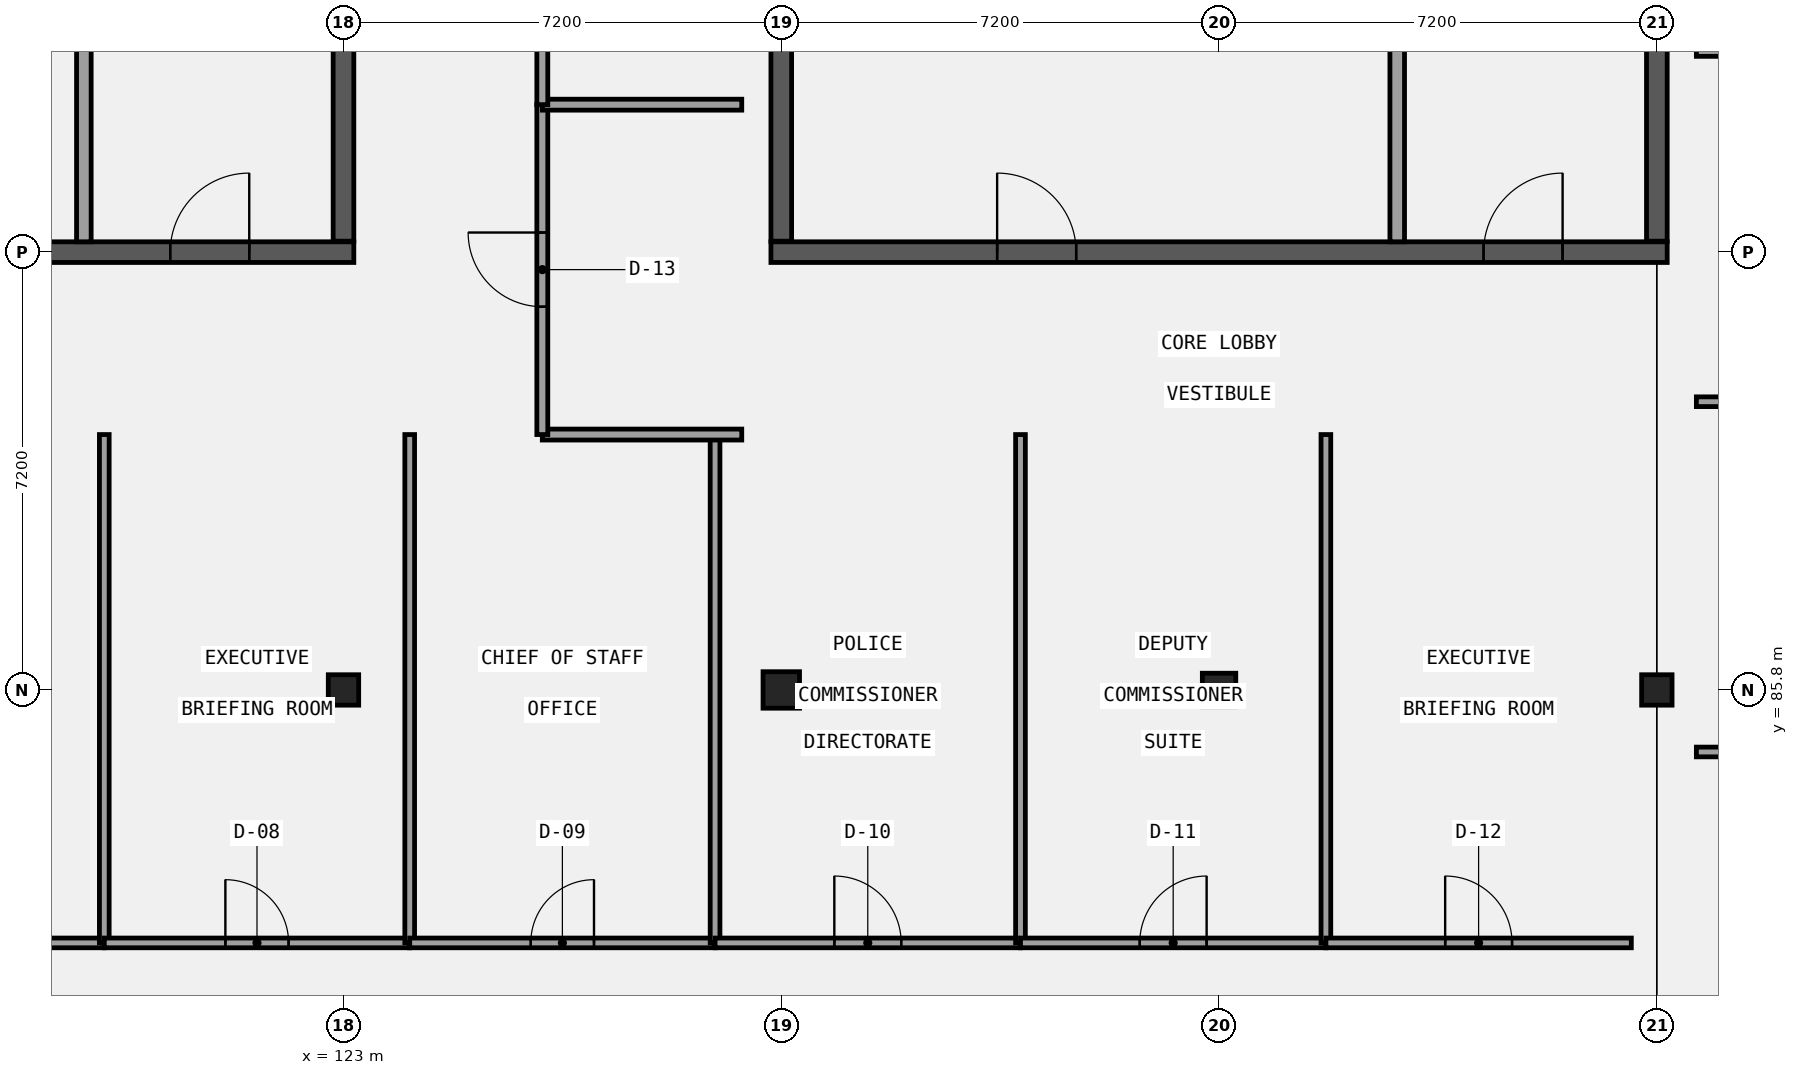
"""IFC4 building model, lengths in metres.
Left out: names, types, materials, properties, quantities, classifications, styles, units other than length and angle.
Written with IfcOpenShell. Run it as: python <this file> out.ifc"""

import sys

from ifc_helpers import new_model, si_unit, direction, frame, frame_2d, origin, origin_2d, place, context, subcontext, project, spatial, rectangle, extrude, element, fill, save


model = new_model("IFC4")
c1 = context("Model", 3, precision=1e-05, world=origin(), true_north=direction((0.0, 1.0)))
c2 = subcontext(c1, "Body", "Model", "MODEL_VIEW")
j1 = project(units=[si_unit("LENGTHUNIT", "METRE"), si_unit("PLANEANGLEUNIT", "RADIAN")], contexts=[c1])
p1 = place(None, origin())
s1 = spatial("IfcSite", under=j1, at=p1, CompositionType="ELEMENT")
p2 = place(p1, origin())
s2 = spatial("IfcBuilding", under=s1, at=p2, CompositionType="ELEMENT")
p3 = place(p2, frame((0.0, 0.0, 22.2)))
s3 = spatial("IfcBuildingStorey", under=s2, at=p3, CompositionType="ELEMENT", Elevation=22.2)
p4 = place(p3, frame((108.43, 93.0, 0.0), z_axis=(0.0, 0.0, 1.0), x_axis=(1.0, 0.0, 0.0)))
e1 = element("IfcWall", 1, at=p4, inside=s3, PredefinedType="SHEAR", context=c2, shape_type="SweptSolid", body=[
    extrude(rectangle(XDim=14.74, YDim=0.34, at=frame_2d((7.37, 0.0))), origin(), (0.0, 0.0, 1.0), 4.2),
])
p5 = place(p4, frame((3.72, 0.0, 0.0)))
e2 = element("IfcOpeningElement", 2, at=p5, cuts=e1, PredefinedType="OPENING", context=c2, shape_type="SweptSolid", body=[
    extrude(rectangle(XDim=1.3, YDim=2.2, at=frame_2d((0.65, 1.1))), frame((0.0, 0.18, 0.0), z_axis=(0.0, -1.0, 0.0), x_axis=(1.0, 0.0, 0.0)), (0.0, 0.0, 1.0), 0.36),
])
p6 = place(p4, frame((11.72, 0.0, 0.0)))
e3 = element("IfcOpeningElement", 3, at=p6, cuts=e1, PredefinedType="OPENING", context=c2, shape_type="SweptSolid", body=[
    extrude(rectangle(XDim=1.3, YDim=2.2, at=frame_2d((0.65, 1.1))), frame((0.0, 0.18, 0.0), z_axis=(0.0, -1.0, 0.0), x_axis=(1.0, 0.0, 0.0)), (0.0, 0.0, 1.0), 0.36),
])
p7 = place(p3, frame((123.0, 93.18, 0.0), z_axis=(0.0, 0.0, 1.0), x_axis=(0.0, 1.0, 0.0)))
e4 = element("IfcWall", 4, at=p7, inside=s3, PredefinedType="SHEAR", context=c2, shape_type="SweptSolid", body=[
    extrude(rectangle(XDim=6.84, YDim=0.34, at=frame_2d((3.42, 0.0))), origin(), (0.0, 0.0, 1.0), 4.2),
])
p8 = place(p3, frame((130.03, 93.0, 0.0), z_axis=(0.0, 0.0, 1.0), x_axis=(1.0, 0.0, 0.0)))
e5 = element("IfcWall", 5, at=p8, inside=s3, PredefinedType="SHEAR", context=c2, shape_type="SweptSolid", body=[
    extrude(rectangle(XDim=14.74, YDim=0.34, at=frame_2d((7.37, 0.0))), origin(), (0.0, 0.0, 1.0), 4.2),
])
p9 = place(p8, frame((3.72, 0.0, 0.0)))
e6 = element("IfcOpeningElement", 6, at=p9, cuts=e5, PredefinedType="OPENING", context=c2, shape_type="SweptSolid", body=[
    extrude(rectangle(XDim=1.3, YDim=2.2, at=frame_2d((0.65, 1.1))), frame((0.0, 0.18, 0.0), z_axis=(0.0, -1.0, 0.0), x_axis=(1.0, 0.0, 0.0)), (0.0, 0.0, 1.0), 0.36),
])
p10 = place(p8, frame((11.72, 0.0, 0.0)))
e7 = element("IfcOpeningElement", 7, at=p10, cuts=e5, PredefinedType="OPENING", context=c2, shape_type="SweptSolid", body=[
    extrude(rectangle(XDim=1.3, YDim=2.2, at=frame_2d((0.65, 1.1))), frame((0.0, 0.18, 0.0), z_axis=(0.0, -1.0, 0.0), x_axis=(1.0, 0.0, 0.0)), (0.0, 0.0, 1.0), 0.36),
])
for number, where, z_axis, x_axis in (
    (8, (130.2, 93.18, 0.0), (0.0, 0.0, 1.0), (0.0, 1.0, 0.0)),
    (9, (144.6, 93.18, 0.0), (0.0, 0.0, 1.0), (0.0, 1.0, 0.0)),
):
    element("IfcWall", number, at=place(p3, frame(where, z_axis=z_axis, x_axis=x_axis)), inside=s3, PredefinedType="SHEAR", context=c2, shape_type="SweptSolid", body=[
        extrude(rectangle(XDim=6.84, YDim=0.34, at=frame_2d((3.42, 0.0))), origin(), (0.0, 0.0, 1.0), 4.2),
    ])
p11 = place(p3, frame((123.0, 85.8, 0.0), z_axis=(0.0, 0.0, 1.0), x_axis=(1.0, 0.0, 0.0)))
e10 = element("IfcColumn", 10, at=p11, inside=s3, PredefinedType="COLUMN", context=c2, shape_type="SweptSolid", body=[
    extrude(rectangle(XDim=0.5, YDim=0.5, at=origin_2d()), origin(), (0.0, 0.0, 1.0), 4.2),
])
p12 = place(p3, frame((130.2, 85.8, 0.0), z_axis=(0.0, 0.0, 1.0), x_axis=(1.0, 0.0, 0.0)))
e11 = element("IfcColumn", 11, at=p12, inside=s3, PredefinedType="COLUMN", context=c2, shape_type="SweptSolid", body=[
    extrude(rectangle(XDim=0.6, YDim=0.6, at=origin_2d()), origin(), (0.0, 0.0, 1.0), 4.2),
])
p13 = place(p3, frame((137.4, 85.8, 0.0), z_axis=(0.0, 0.0, 1.0), x_axis=(1.0, 0.0, 0.0)))
e12 = element("IfcColumn", 12, at=p13, inside=s3, PredefinedType="COLUMN", context=c2, shape_type="SweptSolid", body=[
    extrude(rectangle(XDim=0.55, YDim=0.55, at=origin_2d()), origin(), (0.0, 0.0, 1.0), 4.2),
])
p14 = place(p3, frame((144.6, 85.8, 0.0), z_axis=(0.0, 0.0, 1.0), x_axis=(1.0, 0.0, 0.0)))
e13 = element("IfcColumn", 13, at=p14, inside=s3, PredefinedType="COLUMN", context=c2, shape_type="SweptSolid", body=[
    extrude(rectangle(XDim=0.5, YDim=0.5, at=origin_2d()), origin(), (0.0, 0.0, 1.0), 4.2),
])
for number, where, z_axis, x_axis in (
    (14, (118.73, 93.17, 0.0), (0.0, 0.0, 1.0), (0.0, 1.0, 0.0)),
    (15, (140.33, 93.17, 0.0), (0.0, 0.0, 1.0), (0.0, 1.0, 0.0)),
):
    element("IfcWall", number, at=place(p3, frame(where, z_axis=z_axis, x_axis=x_axis)), inside=s3, PredefinedType="SOLIDWALL", context=c2, shape_type="SweptSolid", body=[
        extrude(rectangle(XDim=3.28, YDim=0.24, at=frame_2d((1.64, 0.0))), origin(), (0.0, 0.0, 1.0), 3.89),
    ])
p15 = place(p3, frame((114.043, 81.64, 0.0), z_axis=(0.0, 0.0, 1.0), x_axis=(1.0, 0.0, 0.0)))
e16 = element("IfcWall", 16, at=p15, inside=s3, PredefinedType="PARTITIONING", context=c2, shape_type="SweptSolid", body=[
    extrude(rectangle(XDim=5.023, YDim=0.16, at=frame_2d((2.511, 0.0))), origin(), (0.0, 0.0, 1.0), 3.92),
])
p16 = place(p15, frame((1.991, 0.0, 0.0)))
e17 = element("IfcOpeningElement", 17, at=p16, cuts=e16, PredefinedType="OPENING", context=c2, shape_type="SweptSolid", body=[
    extrude(rectangle(XDim=1.04, YDim=2.1, at=frame_2d((0.52, 1.05))), frame((0.0, 0.09, 0.0), z_axis=(0.0, -1.0, 0.0), x_axis=(1.0, 0.0, 0.0)), (0.0, 0.0, 1.0), 0.18),
])
p17 = place(p3, frame((119.066, 81.64, 0.0), z_axis=(0.0, 0.0, 1.0), x_axis=(0.0, 1.0, 0.0)))
e18 = element("IfcWall", 18, at=p17, inside=s3, PredefinedType="PARTITIONING", context=c2, shape_type="SweptSolid", body=[
    extrude(rectangle(XDim=8.36, YDim=0.16, at=frame_2d((4.18, 0.0))), origin(), (0.0, 0.0, 1.0), 3.92),
])
p18 = place(p3, frame((119.066, 81.64, 0.0), z_axis=(0.0, 0.0, 1.0), x_axis=(1.0, 0.0, 0.0)))
e19 = element("IfcWall", 19, at=p18, inside=s3, PredefinedType="PARTITIONING", context=c2, shape_type="SweptSolid", body=[
    extrude(rectangle(XDim=5.023, YDim=0.16, at=frame_2d((2.512, 0.0))), origin(), (0.0, 0.0, 1.0), 3.92),
])
p19 = place(p18, frame((1.991, 0.0, 0.0)))
e20 = element("IfcOpeningElement", 20, at=p19, cuts=e19, PredefinedType="OPENING", context=c2, shape_type="SweptSolid", body=[
    extrude(rectangle(XDim=1.04, YDim=2.22, at=frame_2d((0.52, 1.11))), frame((0.0, 0.09, 0.0), z_axis=(0.0, -1.0, 0.0), x_axis=(1.0, 0.0, 0.0)), (0.0, 0.0, 1.0), 0.18),
])
p20 = place(p3, frame((124.089, 81.64, 0.0), z_axis=(0.0, 0.0, 1.0), x_axis=(0.0, 1.0, 0.0)))
e21 = element("IfcWall", 21, at=p20, inside=s3, PredefinedType="PARTITIONING", context=c2, shape_type="SweptSolid", body=[
    extrude(rectangle(XDim=8.36, YDim=0.16, at=frame_2d((4.18, 0.0))), origin(), (0.0, 0.0, 1.0), 3.92),
])
p21 = place(p3, frame((124.089, 81.64, 0.0), z_axis=(0.0, 0.0, 1.0), x_axis=(1.0, 0.0, 0.0)))
e22 = element("IfcWall", 22, at=p21, inside=s3, PredefinedType="PARTITIONING", context=c2, shape_type="SweptSolid", body=[
    extrude(rectangle(XDim=5.022, YDim=0.16, at=frame_2d((2.511, 0.0))), origin(), (0.0, 0.0, 1.0), 3.92),
])
p22 = place(p21, frame((1.991, 0.0, 0.0)))
e23 = element("IfcOpeningElement", 23, at=p22, cuts=e22, PredefinedType="OPENING", context=c2, shape_type="SweptSolid", body=[
    extrude(rectangle(XDim=1.04, YDim=2.35, at=frame_2d((0.52, 1.175))), frame((0.0, 0.09, 0.0), z_axis=(0.0, -1.0, 0.0), x_axis=(1.0, 0.0, 0.0)), (0.0, 0.0, 1.0), 0.18),
])
p23 = place(p3, frame((129.111, 81.64, 0.0), z_axis=(0.0, 0.0, 1.0), x_axis=(0.0, 1.0, 0.0)))
e24 = element("IfcWall", 24, at=p23, inside=s3, PredefinedType="PARTITIONING", context=c2, shape_type="SweptSolid", body=[
    extrude(rectangle(XDim=8.36, YDim=0.16, at=frame_2d((4.18, 0.0))), origin(), (0.0, 0.0, 1.0), 3.92),
])
p24 = place(p3, frame((129.111, 81.64, 0.0), z_axis=(0.0, 0.0, 1.0), x_axis=(1.0, 0.0, 0.0)))
e25 = element("IfcWall", 25, at=p24, inside=s3, PredefinedType="PARTITIONING", context=c2, shape_type="SweptSolid", body=[
    extrude(rectangle(XDim=5.023, YDim=0.16, at=frame_2d((2.511, 0.0))), origin(), (0.0, 0.0, 1.0), 3.92),
])
p25 = place(p24, frame((1.961, 0.0, 0.0)))
e26 = element("IfcOpeningElement", 26, at=p25, cuts=e25, PredefinedType="OPENING", context=c2, shape_type="SweptSolid", body=[
    extrude(rectangle(XDim=1.1, YDim=2.1, at=frame_2d((0.55, 1.05))), frame((0.0, 0.09, 0.0), z_axis=(0.0, -1.0, 0.0), x_axis=(1.0, 0.0, 0.0)), (0.0, 0.0, 1.0), 0.18),
])
p26 = place(p3, frame((134.134, 81.64, 0.0), z_axis=(0.0, 0.0, 1.0), x_axis=(0.0, 1.0, 0.0)))
e27 = element("IfcWall", 27, at=p26, inside=s3, PredefinedType="PARTITIONING", context=c2, shape_type="SweptSolid", body=[
    extrude(rectangle(XDim=8.36, YDim=0.16, at=frame_2d((4.18, 0.0))), origin(), (0.0, 0.0, 1.0), 3.92),
])
p27 = place(p3, frame((134.134, 81.64, 0.0), z_axis=(0.0, 0.0, 1.0), x_axis=(1.0, 0.0, 0.0)))
e28 = element("IfcWall", 28, at=p27, inside=s3, PredefinedType="PARTITIONING", context=c2, shape_type="SweptSolid", body=[
    extrude(rectangle(XDim=5.023, YDim=0.16, at=frame_2d((2.511, 0.0))), origin(), (0.0, 0.0, 1.0), 3.92),
])
p28 = place(p27, frame((1.961, 0.0, 0.0)))
e29 = element("IfcOpeningElement", 29, at=p28, cuts=e28, PredefinedType="OPENING", context=c2, shape_type="SweptSolid", body=[
    extrude(rectangle(XDim=1.1, YDim=2.22, at=frame_2d((0.55, 1.11))), frame((0.0, 0.09, 0.0), z_axis=(0.0, -1.0, 0.0), x_axis=(1.0, 0.0, 0.0)), (0.0, 0.0, 1.0), 0.18),
])
p29 = place(p3, frame((139.157, 81.64, 0.0), z_axis=(0.0, 0.0, 1.0), x_axis=(0.0, 1.0, 0.0)))
e30 = element("IfcWall", 30, at=p29, inside=s3, PredefinedType="PARTITIONING", context=c2, shape_type="SweptSolid", body=[
    extrude(rectangle(XDim=8.36, YDim=0.16, at=frame_2d((4.18, 0.0))), origin(), (0.0, 0.0, 1.0), 3.92),
])
p30 = place(p3, frame((139.157, 81.64, 0.0), z_axis=(0.0, 0.0, 1.0), x_axis=(1.0, 0.0, 0.0)))
e31 = element("IfcWall", 31, at=p30, inside=s3, PredefinedType="PARTITIONING", context=c2, shape_type="SweptSolid", body=[
    extrude(rectangle(XDim=5.023, YDim=0.16, at=frame_2d((2.511, 0.0))), origin(), (0.0, 0.0, 1.0), 3.92),
])
p31 = place(p30, frame((1.961, 0.0, 0.0)))
e32 = element("IfcOpeningElement", 32, at=p31, cuts=e31, PredefinedType="OPENING", context=c2, shape_type="SweptSolid", body=[
    extrude(rectangle(XDim=1.1, YDim=2.35, at=frame_2d((0.55, 1.175))), frame((0.0, 0.09, 0.0), z_axis=(0.0, -1.0, 0.0), x_axis=(1.0, 0.0, 0.0)), (0.0, 0.0, 1.0), 0.18),
])
p32 = place(p3, frame((126.27, 90.0, 0.0), z_axis=(0.0, 0.0, 1.0), x_axis=(1.0, 0.0, 0.0)))
e33 = element("IfcWall", 33, at=p32, inside=s3, PredefinedType="PARTITIONING", context=c2, shape_type="SweptSolid", body=[
    extrude(rectangle(XDim=3.28, YDim=0.18, at=frame_2d((1.64, 0.0))), origin(), (0.0, 0.0, 1.0), 3.92),
])
p33 = place(p3, frame((126.27, 90.0, 0.0), z_axis=(0.0, 0.0, 1.0), x_axis=(0.0, 1.0, 0.0)))
e34 = element("IfcWall", 34, at=p33, inside=s3, PredefinedType="PARTITIONING", context=c2, shape_type="SweptSolid", body=[
    extrude(rectangle(XDim=5.425, YDim=0.18, at=frame_2d((2.712, 0.0))), origin(), (0.0, 0.0, 1.0), 3.92),
])
p34 = place(p33, frame((2.103, 0.0, 0.0)))
e35 = element("IfcOpeningElement", 35, at=p34, cuts=e34, PredefinedType="OPENING", context=c2, shape_type="SweptSolid", body=[
    extrude(rectangle(XDim=1.22, YDim=2.1, at=frame_2d((0.61, 1.05))), frame((0.0, 0.1, 0.0), z_axis=(0.0, -1.0, 0.0), x_axis=(1.0, 0.0, 0.0)), (0.0, 0.0, 1.0), 0.2),
])
p35 = place(p3, frame((126.27, 95.425, 0.0), z_axis=(0.0, 0.0, 1.0), x_axis=(1.0, 0.0, 0.0)))
e36 = element("IfcWall", 36, at=p35, inside=s3, PredefinedType="PARTITIONING", context=c2, shape_type="SweptSolid", body=[
    extrude(rectangle(XDim=3.28, YDim=0.18, at=frame_2d((1.64, 0.0))), origin(), (0.0, 0.0, 1.0), 3.92),
])
p36 = place(p3, frame((126.27, 95.425, 0.0), z_axis=(0.0, 0.0, 1.0), x_axis=(0.0, 1.0, 0.0)))
e37 = element("IfcWall", 37, at=p36, inside=s3, PredefinedType="PARTITIONING", context=c2, shape_type="SweptSolid", body=[
    extrude(rectangle(XDim=5.425, YDim=0.18, at=frame_2d((2.712, 0.0))), origin(), (0.0, 0.0, 1.0), 3.92),
])
p37 = place(p36, frame((2.103, 0.0, 0.0)))
e38 = element("IfcOpeningElement", 38, at=p37, cuts=e37, PredefinedType="OPENING", context=c2, shape_type="SweptSolid", body=[
    extrude(rectangle(XDim=1.22, YDim=2.22, at=frame_2d((0.61, 1.11))), frame((0.0, 0.1, 0.0), z_axis=(0.0, -1.0, 0.0), x_axis=(1.0, 0.0, 0.0)), (0.0, 0.0, 1.0), 0.2),
])
for number, where, z_axis, x_axis in (
    (39, (145.25, 84.78, 0.0), (0.0, 0.0, 1.0), (1.0, 0.0, 0.0)),
    (40, (145.25, 90.54, 0.0), (0.0, 0.0, 1.0), (1.0, 0.0, 0.0)),
    (41, (145.25, 96.3, 0.0), (0.0, 0.0, 1.0), (1.0, 0.0, 0.0)),
):
    element("IfcWall", number, at=place(p3, frame(where, z_axis=z_axis, x_axis=x_axis)), inside=s3, PredefinedType="PARTITIONING", context=c2, shape_type="SweptSolid", body=[
        extrude(rectangle(XDim=8.645, YDim=0.16, at=frame_2d((4.323, 0.0))), origin(), (0.0, 0.0, 1.0), 3.92),
    ])
p38 = place(p6, frame((1.3, 0.0, 0.0), z_axis=(0.0, 0.0, 1.0), x_axis=(-1.0, 0.0, 0.0)))
e42 = element("IfcDoor", 42, at=p38, inside=s3, OperationType="SINGLE_SWING_RIGHT", PredefinedType="DOOR", context=c2, shape_type="SweptSolid", body=[
    extrude(rectangle(XDim=1.3, YDim=2.2, at=frame_2d((0.65, 1.1))), frame((0.0, 0.025, 0.0), z_axis=(0.0, -1.0, 0.0), x_axis=(1.0, 0.0, 0.0)), (0.0, 0.0, 1.0), 0.05),
])
fill(e3, e42)
p39 = place(p9, frame((1.3, 0.0, 0.0), z_axis=(0.0, 0.0, 1.0), x_axis=(-1.0, 0.0, 0.0)))
e43 = element("IfcDoor", 43, at=p39, inside=s3, OperationType="SINGLE_SWING_LEFT", PredefinedType="DOOR", context=c2, shape_type="SweptSolid", body=[
    extrude(rectangle(XDim=1.3, YDim=2.2, at=frame_2d((0.65, 1.1))), frame((0.0, 0.025, 0.0), z_axis=(0.0, -1.0, 0.0), x_axis=(1.0, 0.0, 0.0)), (0.0, 0.0, 1.0), 0.05),
])
fill(e6, e43)
p40 = place(p10, frame((1.3, 0.0, 0.0), z_axis=(0.0, 0.0, 1.0), x_axis=(-1.0, 0.0, 0.0)))
e44 = element("IfcDoor", 44, at=p40, inside=s3, OperationType="SINGLE_SWING_RIGHT", PredefinedType="DOOR", context=c2, shape_type="SweptSolid", body=[
    extrude(rectangle(XDim=1.3, YDim=2.2, at=frame_2d((0.65, 1.1))), frame((0.0, 0.025, 0.0), z_axis=(0.0, -1.0, 0.0), x_axis=(1.0, 0.0, 0.0)), (0.0, 0.0, 1.0), 0.05),
])
fill(e7, e44)
p41 = place(p19, origin())
e45 = element("IfcDoor", 45, at=p41, inside=s3, OperationType="SINGLE_SWING_LEFT", PredefinedType="DOOR", context=c2, shape_type="SweptSolid", body=[
    extrude(rectangle(XDim=1.04, YDim=2.22, at=frame_2d((0.52, 1.11))), frame((0.0, 0.025, 0.0), z_axis=(0.0, -1.0, 0.0), x_axis=(1.0, 0.0, 0.0)), (0.0, 0.0, 1.0), 0.05),
])
fill(e20, e45)
p42 = place(p22, origin())
e46 = element("IfcDoor", 46, at=p42, inside=s3, OperationType="SINGLE_SWING_RIGHT", PredefinedType="DOOR", context=c2, shape_type="SweptSolid", body=[
    extrude(rectangle(XDim=1.04, YDim=2.35, at=frame_2d((0.52, 1.175))), frame((0.0, 0.025, 0.0), z_axis=(0.0, -1.0, 0.0), x_axis=(1.0, 0.0, 0.0)), (0.0, 0.0, 1.0), 0.05),
])
fill(e23, e46)
p43 = place(p25, origin())
e47 = element("IfcDoor", 47, at=p43, inside=s3, OperationType="SINGLE_SWING_LEFT", PredefinedType="DOOR", context=c2, shape_type="SweptSolid", body=[
    extrude(rectangle(XDim=1.1, YDim=2.1, at=frame_2d((0.55, 1.05))), frame((0.0, 0.025, 0.0), z_axis=(0.0, -1.0, 0.0), x_axis=(1.0, 0.0, 0.0)), (0.0, 0.0, 1.0), 0.05),
])
fill(e26, e47)
p44 = place(p28, origin())
e48 = element("IfcDoor", 48, at=p44, inside=s3, OperationType="SINGLE_SWING_RIGHT", PredefinedType="DOOR", context=c2, shape_type="SweptSolid", body=[
    extrude(rectangle(XDim=1.1, YDim=2.22, at=frame_2d((0.55, 1.11))), frame((0.0, 0.025, 0.0), z_axis=(0.0, -1.0, 0.0), x_axis=(1.0, 0.0, 0.0)), (0.0, 0.0, 1.0), 0.05),
])
fill(e29, e48)
p45 = place(p31, origin())
e49 = element("IfcDoor", 49, at=p45, inside=s3, OperationType="SINGLE_SWING_LEFT", PredefinedType="DOOR", context=c2, shape_type="SweptSolid", body=[
    extrude(rectangle(XDim=1.1, YDim=2.35, at=frame_2d((0.55, 1.175))), frame((0.0, 0.025, 0.0), z_axis=(0.0, -1.0, 0.0), x_axis=(1.0, 0.0, 0.0)), (0.0, 0.0, 1.0), 0.05),
])
fill(e32, e49)
p46 = place(p34, origin())
e50 = element("IfcDoor", 50, at=p46, inside=s3, OperationType="SINGLE_SWING_RIGHT", PredefinedType="DOOR", context=c2, shape_type="SweptSolid", body=[
    extrude(rectangle(XDim=1.22, YDim=2.1, at=frame_2d((0.61, 1.05))), frame((0.0, 0.025, 0.0), z_axis=(0.0, -1.0, 0.0), x_axis=(1.0, 0.0, 0.0)), (0.0, 0.0, 1.0), 0.05),
])
fill(e35, e50)
save(model, sys.argv[1])
